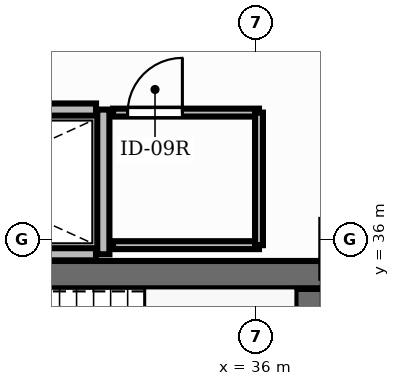
"""IFC4 building model, lengths in metres.
Left out: names, types, materials, properties, quantities, classifications, styles, units other than length and angle.
Written with IfcOpenShell. Run it as: python <this file> out.ifc"""

import sys

from ifc_helpers import new_model, si_unit, direction, frame, frame_2d, origin, place, context, subcontext, project, spatial, rectangle, extrude, element, fill, save


model = new_model("IFC4")
c1 = context("Model", 3, precision=1e-05, world=origin(), true_north=direction((0.0, 1.0)))
c2 = subcontext(c1, "Body", "Model", "MODEL_VIEW")
j1 = project(units=[si_unit("LENGTHUNIT", "METRE"), si_unit("PLANEANGLEUNIT", "RADIAN")], contexts=[c1])
p1 = place(None, origin())
s1 = spatial("IfcSite", under=j1, at=p1, CompositionType="ELEMENT")
p2 = place(p1, origin())
s2 = spatial("IfcBuilding", under=s1, at=p2, CompositionType="ELEMENT")
p3 = place(p2, frame((0.0, 0.0, 15.0)))
s3 = spatial("IfcBuildingStorey", under=s2, at=p3, CompositionType="ELEMENT", Elevation=15.0)
p4 = place(p3, frame((28.852, 35.425, 0.0), z_axis=(0.0, 0.0, 1.0), x_axis=(1.0, 0.0, 0.0)))
e1 = element("IfcWall", 1, at=p4, inside=s3, PredefinedType="SHEAR", context=c2, shape_type="SweptSolid", body=[
    extrude(rectangle(XDim=8.248, YDim=0.45, at=frame_2d((4.124, 0.0))), origin(), (0.0, 0.0, 1.0), 5.05),
])
p5 = place(p3, frame((36.875, 32.11, 0.0), z_axis=(0.0, 0.0, 1.0), x_axis=(0.0, 1.0, 0.0)))
e2 = element("IfcWall", 2, at=p5, inside=s3, PredefinedType="SHEAR", context=c2, shape_type="SweptSolid", body=[
    extrude(rectangle(XDim=3.08, YDim=0.45, at=frame_2d((1.54, 0.0))), origin(), (0.0, 0.0, 1.0), 5.05),
])
p6 = place(p3, frame((33.49, 35.76, 0.0), z_axis=(0.0, 0.0, 1.0), x_axis=(0.0, 1.0, 0.0)))
e3 = element("IfcWall", 3, at=p6, inside=s3, PredefinedType="PARTITIONING", context=c2, shape_type="SweptSolid", body=[
    extrude(rectangle(XDim=2.38, YDim=0.2, at=frame_2d((1.19, 0.0))), origin(), (0.0, 0.0, 1.0), 3.36),
])
for number, where, z_axis, x_axis in (
    (4, (28.8, 35.76, 0.0), (0.0, 0.0, 1.0), (1.0, 0.0, 0.0)),
    (5, (28.8, 38.14, 0.0), (0.0, 0.0, 1.0), (1.0, 0.0, 0.0)),
):
    element("IfcWall", number, at=place(p3, frame(where, z_axis=z_axis, x_axis=x_axis)), inside=s3, PredefinedType="PARTITIONING", context=c2, shape_type="SweptSolid", body=[
        extrude(rectangle(XDim=4.57, YDim=0.2, at=frame_2d((2.285, 0.0))), origin(), (0.0, 0.0, 1.0), 3.36),
    ])
p7 = place(p3, frame((33.65, 38.09, 0.0), z_axis=(0.0, 0.0, 1.0), x_axis=(1.0, 0.0, 0.0)))
e6 = element("IfcWall", 6, at=p7, inside=s3, PredefinedType="PARTITIONING", context=c2, shape_type="SweptSolid", body=[
    extrude(rectangle(XDim=2.4, YDim=0.13, at=frame_2d((1.2, 0.0))), origin(), (0.0, 0.0, 1.0), 3.36),
])
p8 = place(p7, frame((0.24, 0.0, 0.0)))
e7 = element("IfcOpeningElement", 7, at=p8, cuts=e6, PredefinedType="OPENING", context=c2, shape_type="SweptSolid", body=[
    extrude(rectangle(XDim=0.9, YDim=2.15, at=frame_2d((0.45, 1.075))), frame((0.0, 0.08, 0.0), z_axis=(0.0, -1.0, 0.0), x_axis=(1.0, 0.0, 0.0)), (0.0, 0.0, 1.0), 0.16),
])
p9 = place(p3, frame((36.05, 35.91, 0.0), z_axis=(0.0, 0.0, 1.0), x_axis=(-1.0, 0.0, 0.0)))
e8 = element("IfcWall", 8, at=p9, inside=s3, PredefinedType="PARTITIONING", context=c2, shape_type="SweptSolid", body=[
    extrude(rectangle(XDim=2.4, YDim=0.13, at=frame_2d((1.2, 0.0))), origin(), (0.0, 0.0, 1.0), 3.36),
])
p10 = place(p3, frame((36.05, 38.09, 0.0), z_axis=(0.0, 0.0, 1.0), x_axis=(0.0, -1.0, 0.0)))
e9 = element("IfcWall", 9, at=p10, inside=s3, PredefinedType="PARTITIONING", context=c2, shape_type="SweptSolid", body=[
    extrude(rectangle(XDim=2.18, YDim=0.13, at=frame_2d((1.09, 0.0))), origin(), (0.0, 0.0, 1.0), 3.36),
])
p11 = place(p8, origin())
e10 = element("IfcDoor", 10, at=p11, inside=s3, OperationType="SINGLE_SWING_RIGHT", PredefinedType="DOOR", context=c2, shape_type="SweptSolid", body=[
    extrude(rectangle(XDim=0.9, YDim=2.15, at=frame_2d((0.45, 1.075))), frame((0.0, 0.025, 0.0), z_axis=(0.0, -1.0, 0.0), x_axis=(1.0, 0.0, 0.0)), (0.0, 0.0, 1.0), 0.05),
])
fill(e7, e10)
save(model, sys.argv[1])
